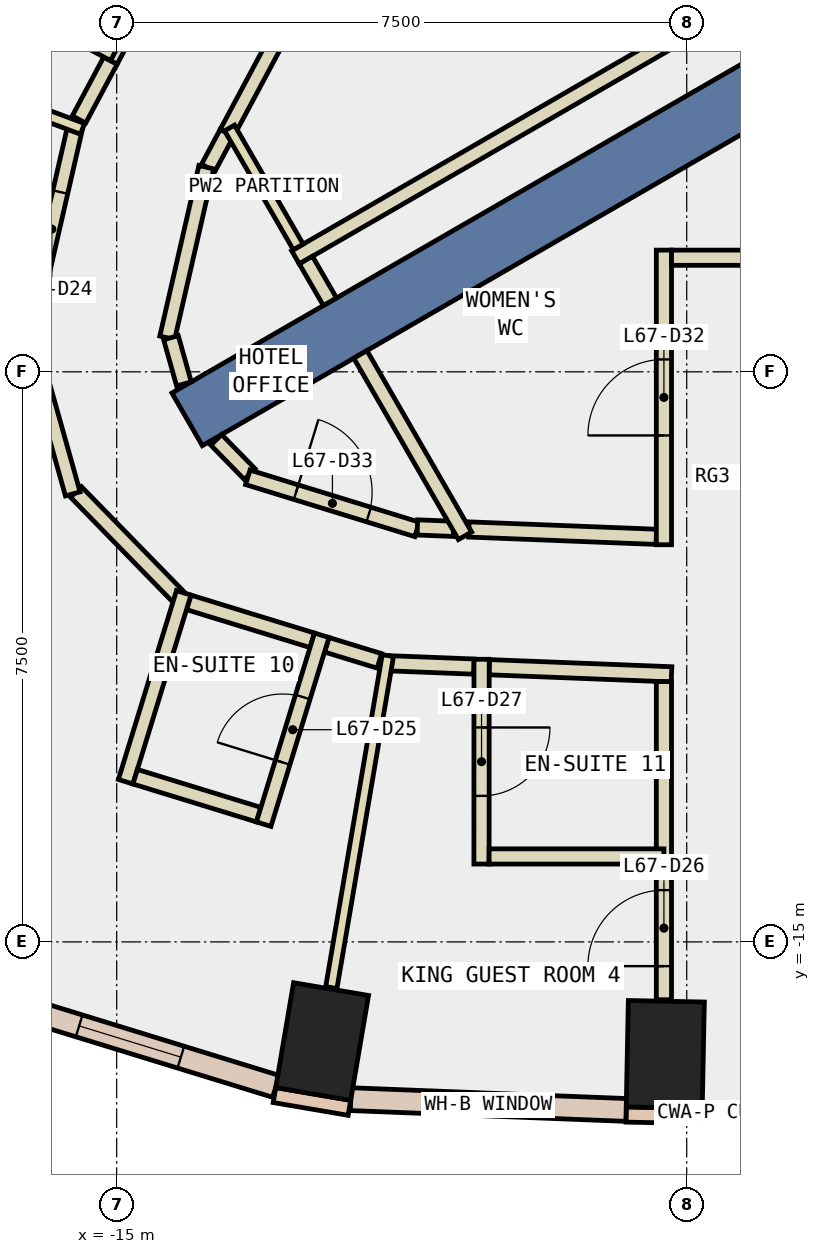
"""IFC4 building model, lengths in metres.
Left out: names, types, materials, properties, quantities, classifications, styles, units other than length and angle.
Written with IfcOpenShell. Run it as: python <this file> out.ifc"""

import sys

from ifc_helpers import new_model, si_unit, direction, frame, frame_2d, origin, origin_2d, place, context, subcontext, project, spatial, polyline, rectangle, outline, extrude, element, fill, save


model = new_model("IFC4")
c1 = context("Model", 3, precision=1e-05, world=origin(), true_north=direction((0.0, 1.0)))
c2 = subcontext(c1, "Body", "Model", "MODEL_VIEW")
j1 = project(units=[si_unit("LENGTHUNIT", "METRE"), si_unit("PLANEANGLEUNIT", "RADIAN")], contexts=[c1])
p1 = place(None, origin())
s1 = spatial("IfcSite", under=j1, at=p1, CompositionType="ELEMENT")
p2 = place(p1, origin())
s2 = spatial("IfcBuilding", under=s1, at=p2, CompositionType="ELEMENT")
p3 = place(p2, frame((0.0, 0.0, 290.0)))
s3 = spatial("IfcBuildingStorey", under=s2, at=p3, CompositionType="ELEMENT", Elevation=290.0)
for number, where, z_axis, x_axis in (
    (1, (-12.297, -16.311, -0.34), (0.0, 0.0, 1.0), (-0.986, 0.168, 0.0)),
    (2, (-7.782, -16.481, -0.34), (0.0, 0.0, 1.0), (-1.0, 0.02, 0.0)),
):
    element("IfcColumn", number, at=place(p3, frame(where, z_axis=z_axis, x_axis=x_axis)), inside=s3, PredefinedType="COLUMN", context=c2, shape_type="SweptSolid", body=[
        extrude(rectangle(XDim=1.0, YDim=1.4, at=origin_2d()), origin(), (0.0, 0.0, 1.0), 3.6),
    ])
p4 = place(p3, frame((0.0, 0.0, -0.34)))
e3 = element("IfcWall", 3, at=p4, inside=s3, PredefinedType="SHEAR", context=c2, shape_type="SweptSolid", body=[
    extrude(outline(polyline([(-9.815, 2.5), (-4.907, -6.0), (-4.619, -5.5), (-9.238, 2.5), (-9.815, 2.5)])), origin(), (0.0, 0.0, 1.0), 3.6),
])
p5 = place(p3, frame((-6.279, -3.625, -0.34), z_axis=(0.0, 0.0, 1.0), x_axis=(-0.866017533419, -0.500013631625, 0.0)))
e4 = element("IfcWall", 4, at=p5, inside=s3, PredefinedType="SHEAR", context=c2, shape_type="SweptSolid", body=[
    extrude(rectangle(XDim=9.0, YDim=0.8, at=frame_2d((4.5, 0.0))), origin(), (0.0, 0.0, 1.0), 3.6),
])
for number, where, z_axis, x_axis in (
    (5, (-12.924, -17.015, 0.0), (0.0, 0.0, 1.0), (0.986, -0.168, 0.0)),
    (6, (-8.298, -17.271, 0.0), (0.0, 0.0, 1.0), (1.0, -0.02, 0.0)),
):
    element("IfcWall", number, at=place(p3, frame(where, z_axis=z_axis, x_axis=x_axis)), inside=s3, PredefinedType="STANDARD", context=c2, shape_type="SweptSolid", body=[
        extrude(rectangle(XDim=1.0, YDim=0.2, at=frame_2d((0.5, 0.0))), origin(), (0.0, 0.0, 1.0), 3.26),
    ])
p6 = place(p3, frame((-11.92, -17.069, 0.0), z_axis=(0.0, 0.0, 1.0), x_axis=(0.999234893779, -0.039110446866, 0.0)))
e7 = element("IfcWall", 7, at=p6, inside=s3, PredefinedType="STANDARD", context=c2, shape_type="SweptSolid", body=[
    extrude(rectangle(XDim=3.627, YDim=0.3, at=frame_2d((1.813, 0.0))), origin(), (0.0, 0.0, 1.0), 3.26),
])
p7 = place(p6, frame((1.113, 0.0, 0.9)))
e8 = element("IfcOpeningElement", 8, at=p7, cuts=e7, PredefinedType="OPENING", context=c2, shape_type="SweptSolid", body=[
    extrude(rectangle(XDim=1.4, YDim=2.0, at=frame_2d((0.7, 1.0))), frame((0.0, 0.16, 0.0), z_axis=(0.0, -1.0, 0.0), x_axis=(1.0, 0.0, 0.0)), (0.0, 0.0, 1.0), 0.32),
])
p8 = place(p3, frame((-16.746, -15.72, 0.0), z_axis=(0.0, 0.0, 1.0), x_axis=(0.955866957005, -0.293799864716, 0.0)))
e9 = element("IfcWall", 9, at=p8, inside=s3, PredefinedType="STANDARD", context=c2, shape_type="SweptSolid", body=[
    extrude(rectangle(XDim=4.02, YDim=0.3, at=frame_2d((2.01, 0.0))), origin(), (0.0, 0.0, 1.0), 3.26),
])
p9 = place(p8, frame((1.31, 0.0, 0.9)))
e10 = element("IfcOpeningElement", 10, at=p9, cuts=e9, PredefinedType="OPENING", context=c2, shape_type="SweptSolid", body=[
    extrude(rectangle(XDim=1.4, YDim=2.0, at=frame_2d((0.7, 1.0))), frame((0.0, 0.16, 0.0), z_axis=(0.0, -1.0, 0.0), x_axis=(1.0, 0.0, 0.0)), (0.0, 0.0, 1.0), 0.32),
])
p10 = place(p3, frame((-10.639, 1.084, 0.0), z_axis=(0.0, 0.0, 1.0), x_axis=(-0.471696599276, -0.881760918975, 0.0)))
e11 = element("IfcWall", 11, at=p10, inside=s3, PredefinedType="PARTITIONING", context=c2, shape_type="SweptSolid", body=[
    extrude(rectangle(XDim=6.172, YDim=0.2, at=frame_2d((3.086, 0.0))), origin(), (0.0, 0.0, 1.0), 3.26),
])
p11 = place(p10, frame((2.458, 0.0, 0.0)))
e12 = element("IfcOpeningElement", 12, at=p11, cuts=e11, PredefinedType="OPENING", context=c2, shape_type="SweptSolid", body=[
    extrude(rectangle(XDim=1.0, YDim=2.1, at=frame_2d((0.5, 1.05))), frame((0.0, 0.11, 0.0), z_axis=(0.0, -1.0, 0.0), x_axis=(1.0, 0.0, 0.0)), (0.0, 0.0, 1.0), 0.22),
])
p12 = place(p3, frame((-10.367, -9.574, 0.0), z_axis=(0.0, 0.0, 1.0), x_axis=(0.999229139158, -0.039257196264, 0.0)))
e13 = element("IfcWall", 13, at=p12, inside=s3, PredefinedType="PARTITIONING", context=c2, shape_type="SweptSolid", body=[
    extrude(rectangle(XDim=2.469, YDim=0.2, at=frame_2d((1.234, 0.0))), origin(), (0.0, 0.0, 1.0), 3.26),
])
p13 = place(p3, frame((-13.55, -4.358, 0.0), z_axis=(0.0, 0.0, 1.0), x_axis=(-0.472169364753, -0.881507850781, 0.0)))
e14 = element("IfcWall", 14, at=p13, inside=s3, PredefinedType="PARTITIONING", context=c2, shape_type="SweptSolid", body=[
    extrude(rectangle(XDim=0.521, YDim=0.2, at=frame_2d((0.26, 0.0))), origin(), (0.0, 0.0, 1.0), 3.26),
])
p14 = place(p3, frame((-13.821, -4.808, 0.0), z_axis=(0.0, 0.0, 1.0), x_axis=(-0.223248099856, -0.97476165595, 0.0)))
e15 = element("IfcWall", 15, at=p14, inside=s3, PredefinedType="PARTITIONING", context=c2, shape_type="SweptSolid", body=[
    extrude(rectangle(XDim=2.302, YDim=0.2, at=frame_2d((1.151, 0.0))), origin(), (0.0, 0.0, 1.0), 3.26),
])
p15 = place(p3, frame((-14.286, -7.051, 0.0), z_axis=(0.0, 0.0, 1.0), x_axis=(0.270633612894, -0.96268242301, 0.0)))
e16 = element("IfcWall", 16, at=p15, inside=s3, PredefinedType="PARTITIONING", context=c2, shape_type="SweptSolid", body=[
    extrude(rectangle(XDim=0.632, YDim=0.2, at=frame_2d((0.316, 0.0))), origin(), (0.0, 0.0, 1.0), 3.26),
])
p16 = place(p3, frame((-13.69, -8.395, 0.0), z_axis=(0.0, 0.0, 1.0), x_axis=(0.698333537371, -0.715772499181, 0.0)))
e17 = element("IfcWall", 17, at=p16, inside=s3, PredefinedType="PARTITIONING", context=c2, shape_type="SweptSolid", body=[
    extrude(rectangle(XDim=0.63, YDim=0.2, at=frame_2d((0.315, 0.0))), origin(), (0.0, 0.0, 1.0), 3.26),
])
p17 = place(p3, frame((-13.275, -8.888, 0.0), z_axis=(0.0, 0.0, 1.0), x_axis=(0.955792602122, -0.294041666654, 0.0)))
e18 = element("IfcWall", 18, at=p17, inside=s3, PredefinedType="PARTITIONING", context=c2, shape_type="SweptSolid", body=[
    extrude(rectangle(XDim=2.33, YDim=0.2, at=frame_2d((1.165, 0.0))), origin(), (0.0, 0.0, 1.0), 3.26),
])
p18 = place(p17, frame((0.665, 0.0, 0.0)))
e19 = element("IfcOpeningElement", 19, at=p18, cuts=e18, PredefinedType="OPENING", context=c2, shape_type="SweptSolid", body=[
    extrude(rectangle(XDim=1.0, YDim=2.1, at=frame_2d((0.5, 1.05))), frame((0.0, 0.11, 0.0), z_axis=(0.0, -1.0, 0.0), x_axis=(1.0, 0.0, 0.0)), (0.0, 0.0, 1.0), 0.22),
])
p19 = place(p3, frame((-11.044, -9.547, 0.0), z_axis=(0.0, 0.0, 1.0), x_axis=(0.999224473046, -0.039375785274, 0.0)))
e20 = element("IfcWall", 20, at=p19, inside=s3, PredefinedType="PARTITIONING", context=c2, shape_type="SweptSolid", body=[
    extrude(rectangle(XDim=0.478, YDim=0.2, at=frame_2d((0.239, 0.0))), origin(), (0.0, 0.0, 1.0), 3.26),
])
p20 = place(p3, frame((-15.496, -4.18, 0.0), z_axis=(0.0, 0.0, 1.0), x_axis=(0.471280380621, 0.881983448167, 0.0)))
e21 = element("IfcWall", 21, at=p20, inside=s3, PredefinedType="PARTITIONING", context=c2, shape_type="SweptSolid", body=[
    extrude(rectangle(XDim=0.879, YDim=0.2, at=frame_2d((0.439, 0.0))), origin(), (0.0, 0.0, 1.0), 3.26),
])
p21 = place(p3, frame((-15.082, -3.405, 0.0), z_axis=(0.0, 0.0, 1.0), x_axis=(0.471719946084, 0.88174842924, 0.0)))
e22 = element("IfcWall", 22, at=p21, inside=s3, PredefinedType="PARTITIONING", context=c2, shape_type="SweptSolid", body=[
    extrude(rectangle(XDim=3.0, YDim=0.2, at=frame_2d((1.5, 0.0))), origin(), (0.0, 0.0, 1.0), 3.26),
])
p22 = place(p3, frame((-11.544, -11.303, 0.0), z_axis=(0.0, 0.0, 1.0), x_axis=(-0.956186468463, 0.292758326147, 0.0)))
e23 = element("IfcWall", 23, at=p22, inside=s3, PredefinedType="PARTITIONING", context=c2, shape_type="SweptSolid", body=[
    extrude(rectangle(XDim=0.724, YDim=0.2, at=frame_2d((0.362, 0.0))), origin(), (0.0, 0.0, 1.0), 3.26),
])
p23 = place(p3, frame((-14.147, -10.503, 0.0), z_axis=(0.0, 0.0, 1.0), x_axis=(-0.698515752779, 0.715594677957, 0.0)))
e24 = element("IfcWall", 24, at=p23, inside=s3, PredefinedType="PARTITIONING", context=c2, shape_type="SweptSolid", body=[
    extrude(rectangle(XDim=1.987, YDim=0.2, at=frame_2d((0.994, 0.0))), origin(), (0.0, 0.0, 1.0), 3.26),
])
p24 = place(p3, frame((-15.578, -9.106, 0.0), z_axis=(0.0, 0.0, 1.0), x_axis=(-0.270688011946, 0.962667128445, 0.0)))
e25 = element("IfcWall", 25, at=p24, inside=s3, PredefinedType="PARTITIONING", context=c2, shape_type="SweptSolid", body=[
    extrude(rectangle(XDim=2.088, YDim=0.2, at=frame_2d((1.044, 0.0))), origin(), (0.0, 0.0, 1.0), 3.26),
])
p25 = place(p3, frame((-16.192, -7.098, 0.0), z_axis=(0.0, 0.0, 1.0), x_axis=(0.22330023395, 0.974749714295, 0.0)))
e26 = element("IfcWall", 26, at=p25, inside=s3, PredefinedType="PARTITIONING", context=c2, shape_type="SweptSolid", body=[
    extrude(rectangle(XDim=2.928, YDim=0.2, at=frame_2d((1.464, 0.0))), origin(), (0.0, 0.0, 1.0), 3.26),
])
p26 = place(p25, frame((1.014, 0.0, 0.0)))
e27 = element("IfcOpeningElement", 27, at=p26, cuts=e26, PredefinedType="OPENING", context=c2, shape_type="SweptSolid", body=[
    extrude(rectangle(XDim=1.0, YDim=2.1, at=frame_2d((0.5, 1.05))), frame((0.0, 0.11, 0.0), z_axis=(0.0, -1.0, 0.0), x_axis=(1.0, 0.0, 0.0)), (0.0, 0.0, 1.0), 0.22),
])
p27 = place(p3, frame((-12.427, -11.032, 0.0), z_axis=(0.0, 0.0, 1.0), x_axis=(-0.955940341053, 0.293561006177, 0.0)))
e28 = element("IfcWall", 28, at=p27, inside=s3, PredefinedType="PARTITIONING", context=c2, shape_type="SweptSolid", body=[
    extrude(rectangle(XDim=1.7, YDim=0.2, at=frame_2d((0.85, 0.0))), origin(), (0.0, 0.0, 1.0), 3.26),
])
p28 = place(p3, frame((-10.299, -11.378, 0.0), z_axis=(0.0, 0.0, 1.0), x_axis=(-0.999237995813, 0.03903111224, 0.0)))
e29 = element("IfcWall", 29, at=p28, inside=s3, PredefinedType="PARTITIONING", context=c2, shape_type="SweptSolid", body=[
    extrude(rectangle(XDim=1.176, YDim=0.2, at=frame_2d((0.588, 0.0))), origin(), (0.0, 0.0, 1.0), 3.26),
])
p29 = place(p3, frame((-7.7, -11.48, 0.0), z_axis=(0.0, 0.0, 1.0), x_axis=(-0.999233433291, 0.039147743138, 0.0)))
e30 = element("IfcWall", 30, at=p29, inside=s3, PredefinedType="PARTITIONING", context=c2, shape_type="SweptSolid", body=[
    extrude(rectangle(XDim=2.401, YDim=0.2, at=frame_2d((1.201, 0.0))), origin(), (0.0, 0.0, 1.0), 3.26),
])
p30 = place(p3, frame((-7.8, -9.775, 0.0), z_axis=(0.0, 0.0, 1.0), x_axis=(0.0, 1.0, 0.0)))
e31 = element("IfcWall", 31, at=p30, inside=s3, PredefinedType="PARTITIONING", context=c2, shape_type="SweptSolid", body=[
    extrude(rectangle(XDim=3.876, YDim=0.2, at=frame_2d((1.938, 0.0))), origin(), (0.0, 0.0, 1.0), 3.26),
])
p31 = place(p30, frame((1.438, 0.0, 0.0)))
e32 = element("IfcOpeningElement", 32, at=p31, cuts=e31, PredefinedType="OPENING", context=c2, shape_type="SweptSolid", body=[
    extrude(rectangle(XDim=1.0, YDim=2.1, at=frame_2d((0.5, 1.05))), frame((0.0, 0.11, 0.0), z_axis=(0.0, -1.0, 0.0), x_axis=(1.0, 0.0, 0.0)), (0.0, 0.0, 1.0), 0.22),
])
p32 = place(p3, frame((-7.7, -5.999, 0.0), z_axis=(0.0, 0.0, 1.0), x_axis=(1.0, 0.0, 0.0)))
e33 = element("IfcWall", 33, at=p32, inside=s3, PredefinedType="PARTITIONING", context=c2, shape_type="SweptSolid", body=[
    extrude(rectangle(XDim=2.792, YDim=0.2, at=frame_2d((1.396, 0.0))), origin(), (0.0, 0.0, 1.0), 3.26),
])
p33 = place(p3, frame((-7.8, -15.761, 0.0), z_axis=(0.0, 0.0, 1.0), x_axis=(0.0, 1.0, 0.0)))
e34 = element("IfcWall", 34, at=p33, inside=s3, PredefinedType="PARTITIONING", context=c2, shape_type="SweptSolid", body=[
    extrude(rectangle(XDim=1.785, YDim=0.2, at=frame_2d((0.893, 0.0))), origin(), (0.0, 0.0, 1.0), 3.26),
])
p34 = place(p33, frame((0.442, 0.0, 0.0)))
e35 = element("IfcOpeningElement", 35, at=p34, cuts=e34, PredefinedType="OPENING", context=c2, shape_type="SweptSolid", body=[
    extrude(rectangle(XDim=1.0, YDim=2.1, at=frame_2d((0.5, 1.05))), frame((0.0, 0.11, 0.0), z_axis=(0.0, -1.0, 0.0), x_axis=(1.0, 0.0, 0.0)), (0.0, 0.0, 1.0), 0.22),
])
p35 = place(p3, frame((-7.8, -13.976, 0.0), z_axis=(0.0, 0.0, 1.0), x_axis=(0.0, 1.0, 0.0)))
e36 = element("IfcWall", 36, at=p35, inside=s3, PredefinedType="PARTITIONING", context=c2, shape_type="SweptSolid", body=[
    extrude(rectangle(XDim=2.4, YDim=0.2, at=frame_2d((1.2, 0.0))), origin(), (0.0, 0.0, 1.0), 3.26),
])
p36 = place(p3, frame((-6.845, -2.643, 0.0), z_axis=(0.0, 0.0, 1.0), x_axis=(-0.865994457699, -0.500053596362, 0.0)))
e37 = element("IfcWall", 37, at=p36, inside=s3, PredefinedType="PARTITIONING", context=c2, shape_type="SweptSolid", body=[
    extrude(rectangle(XDim=6.701, YDim=0.2, at=frame_2d((3.351, 0.0))), origin(), (0.0, 0.0, 1.0), 3.26),
])
p37 = place(p3, frame((-12.611, -5.857, 0.0), z_axis=(0.0, 0.0, 1.0), x_axis=(-0.500120037633, 0.865956088932, 0.0)))
e38 = element("IfcWall", 38, at=p37, inside=s3, PredefinedType="PARTITIONING", context=c2, shape_type="SweptSolid", body=[
    extrude(rectangle(XDim=1.807, YDim=0.15, at=frame_2d((0.904, 0.0))), origin(), (0.0, 0.0, 1.0), 3.26),
])
p38 = place(p3, frame((-10.417, -9.657, 0.0), z_axis=(0.0, 0.0, 1.0), x_axis=(-0.499837531988, 0.866119184418, 0.0)))
e39 = element("IfcWall", 39, at=p38, inside=s3, PredefinedType="PARTITIONING", context=c2, shape_type="SweptSolid", body=[
    extrude(rectangle(XDim=2.755, YDim=0.2, at=frame_2d((1.377, 0.0))), origin(), (0.0, 0.0, 1.0), 3.26),
])
p39 = place(p3, frame((-17.239, -2.137, 0.0), z_axis=(0.0, 0.0, 1.0), x_axis=(0.881706262609, -0.471798756332, 0.0)))
e40 = element("IfcWall", 40, at=p39, inside=s3, PredefinedType="PARTITIONING", context=c2, shape_type="SweptSolid", body=[
    extrude(rectangle(XDim=2.501, YDim=0.2, at=frame_2d((1.25, 0.0))), origin(), (0.0, 0.0, 1.0), 3.26),
])
p40 = place(p3, frame((-15.45, -4.304, 0.0), z_axis=(0.0, 0.0, 1.0), x_axis=(-0.936458128132, 0.350779381172, 0.0)))
e41 = element("IfcWall", 41, at=p40, inside=s3, PredefinedType="PARTITIONING", context=c2, shape_type="SweptSolid", body=[
    extrude(rectangle(XDim=4.433, YDim=0.15, at=frame_2d((2.216, 0.0))), origin(), (0.0, 0.0, 1.0), 3.26),
])
p41 = place(p3, frame((-14.118, -10.408, 0.0), z_axis=(0.0, 0.0, 1.0), x_axis=(-0.293914282011, -0.955831781659, 0.0)))
e42 = element("IfcWall", 42, at=p41, inside=s3, PredefinedType="PARTITIONING", context=c2, shape_type="SweptSolid", body=[
    extrude(rectangle(XDim=2.6, YDim=0.2, at=frame_2d((1.3, 0.0))), origin(), (0.0, 0.0, 1.0), 3.26),
])
p42 = place(p3, frame((-14.757, -12.827, 0.0), z_axis=(0.0, 0.0, 1.0), x_axis=(0.955940341053, -0.293561006177, 0.0)))
e43 = element("IfcWall", 43, at=p42, inside=s3, PredefinedType="PARTITIONING", context=c2, shape_type="SweptSolid", body=[
    extrude(rectangle(XDim=1.7, YDim=0.2, at=frame_2d((0.85, 0.0))), origin(), (0.0, 0.0, 1.0), 3.26),
])
p43 = place(p3, frame((-13.066, -13.451, 0.0), z_axis=(0.0, 0.0, 1.0), x_axis=(0.293854864179, 0.955850050373, 0.0)))
e44 = element("IfcWall", 44, at=p43, inside=s3, PredefinedType="PARTITIONING", context=c2, shape_type="SweptSolid", body=[
    extrude(rectangle(XDim=2.6, YDim=0.2, at=frame_2d((1.3, 0.0))), origin(), (0.0, 0.0, 1.0), 3.26),
])
p44 = place(p43, frame((0.85, 0.0, 0.0)))
e45 = element("IfcOpeningElement", 45, at=p44, cuts=e44, PredefinedType="OPENING", context=c2, shape_type="SweptSolid", body=[
    extrude(rectangle(XDim=0.9, YDim=2.1, at=frame_2d((0.45, 1.05))), frame((0.0, 0.11, 0.0), z_axis=(0.0, -1.0, 0.0), x_axis=(1.0, 0.0, 0.0)), (0.0, 0.0, 1.0), 0.22),
])
p45 = place(p3, frame((-11.432, -11.234, 0.0), z_axis=(0.0, 0.0, 1.0), x_axis=(-0.16797255243, -0.98579167253, 0.0)))
e46 = element("IfcWall", 46, at=p45, inside=s3, PredefinedType="PARTITIONING", context=c2, shape_type="SweptSolid", body=[
    extrude(rectangle(XDim=4.43, YDim=0.15, at=frame_2d((2.215, 0.0))), origin(), (0.0, 0.0, 1.0), 3.26),
])
p46 = place(p3, frame((-10.199, -11.282, 0.0), z_axis=(0.0, 0.0, 1.0), x_axis=(-0.000362482985, -0.999999934303, 0.0)))
e47 = element("IfcWall", 47, at=p46, inside=s3, PredefinedType="PARTITIONING", context=c2, shape_type="SweptSolid", body=[
    extrude(rectangle(XDim=2.694, YDim=0.2, at=frame_2d((1.347, 0.0))), origin(), (0.0, 0.0, 1.0), 3.26),
])
p47 = place(p46, frame((0.897, 0.0, 0.0)))
e48 = element("IfcOpeningElement", 48, at=p47, cuts=e47, PredefinedType="OPENING", context=c2, shape_type="SweptSolid", body=[
    extrude(rectangle(XDim=0.9, YDim=2.1, at=frame_2d((0.45, 1.05))), frame((0.0, 0.11, 0.0), z_axis=(0.0, -1.0, 0.0), x_axis=(1.0, 0.0, 0.0)), (0.0, 0.0, 1.0), 0.22),
])
p48 = place(p3, frame((-10.1, -13.876, 0.0), z_axis=(0.0, 0.0, 1.0), x_axis=(1.0, 0.0, 0.0)))
e49 = element("IfcWall", 49, at=p48, inside=s3, PredefinedType="PARTITIONING", context=c2, shape_type="SweptSolid", body=[
    extrude(rectangle(XDim=2.3, YDim=0.2, at=frame_2d((1.15, 0.0))), origin(), (0.0, 0.0, 1.0), 3.26),
])
p49 = place(p3, frame((-12.194, -6.578, 0.0), z_axis=(0.0, 0.0, 1.0), x_axis=(-0.500701704226, 0.865619895442, 0.0)))
e50 = element("IfcWall", 50, at=p49, inside=s3, PredefinedType="PARTITIONING", context=c2, shape_type="SweptSolid", body=[
    extrude(rectangle(XDim=0.633, YDim=0.2, at=frame_2d((0.316, 0.0))), origin(), (0.0, 0.0, 1.0), 3.26),
])
p50 = place(p3, frame((-8.192, 0.888, 0.0), z_axis=(0.0, 0.0, 1.0), x_axis=(0.500034260056, -0.866005622828, 0.0)))
e51 = element("IfcWall", 51, at=p50, inside=s3, PredefinedType="STANDARD", context=c2, shape_type="SweptSolid", body=[
    extrude(rectangle(XDim=5.399, YDim=0.2, at=frame_2d((2.7, 0.0))), origin(), (0.0, 0.0, 1.0), 3.26),
])
p51 = place(p7, origin())
e52 = element("IfcWindow", 52, at=p51, inside=s3, PartitioningType="SINGLE_PANEL", PredefinedType="WINDOW", context=c2, shape_type="SweptSolid", body=[
    extrude(rectangle(XDim=1.4, YDim=2.0, at=frame_2d((0.7, 1.0))), frame((0.0, 0.03, 0.0), z_axis=(0.0, -1.0, 0.0), x_axis=(1.0, 0.0, 0.0)), (0.0, 0.0, 1.0), 0.06),
])
fill(e8, e52)
p52 = place(p9, origin())
e53 = element("IfcWindow", 53, at=p52, inside=s3, PartitioningType="SINGLE_PANEL", PredefinedType="WINDOW", context=c2, shape_type="SweptSolid", body=[
    extrude(rectangle(XDim=1.4, YDim=2.0, at=frame_2d((0.7, 1.0))), frame((0.0, 0.03, 0.0), z_axis=(0.0, -1.0, 0.0), x_axis=(1.0, 0.0, 0.0)), (0.0, 0.0, 1.0), 0.06),
])
fill(e10, e53)
p53 = place(p26, origin())
e54 = element("IfcDoor", 54, at=p53, inside=s3, OperationType="SINGLE_SWING_LEFT", PredefinedType="DOOR", context=c2, shape_type="SweptSolid", body=[
    extrude(rectangle(XDim=1.0, YDim=2.1, at=frame_2d((0.5, 1.05))), frame((0.0, 0.025, 0.0), z_axis=(0.0, -1.0, 0.0), x_axis=(1.0, 0.0, 0.0)), (0.0, 0.0, 1.0), 0.05),
])
fill(e27, e54)
p54 = place(p44, origin())
e55 = element("IfcDoor", 55, at=p54, inside=s3, OperationType="SINGLE_SWING_LEFT", PredefinedType="DOOR", context=c2, shape_type="SweptSolid", body=[
    extrude(rectangle(XDim=0.9, YDim=2.1, at=frame_2d((0.45, 1.05))), frame((0.0, 0.025, 0.0), z_axis=(0.0, -1.0, 0.0), x_axis=(1.0, 0.0, 0.0)), (0.0, 0.0, 1.0), 0.05),
])
fill(e45, e55)
p55 = place(p34, origin())
e56 = element("IfcDoor", 56, at=p55, inside=s3, OperationType="SINGLE_SWING_RIGHT", PredefinedType="DOOR", context=c2, shape_type="SweptSolid", body=[
    extrude(rectangle(XDim=1.0, YDim=2.1, at=frame_2d((0.5, 1.05))), frame((0.0, 0.025, 0.0), z_axis=(0.0, -1.0, 0.0), x_axis=(1.0, 0.0, 0.0)), (0.0, 0.0, 1.0), 0.05),
])
fill(e35, e56)
p56 = place(p47, origin())
e57 = element("IfcDoor", 57, at=p56, inside=s3, OperationType="SINGLE_SWING_LEFT", PredefinedType="DOOR", context=c2, shape_type="SweptSolid", body=[
    extrude(rectangle(XDim=0.9, YDim=2.1, at=frame_2d((0.45, 1.05))), frame((0.0, 0.025, 0.0), z_axis=(0.0, -1.0, 0.0), x_axis=(1.0, 0.0, 0.0)), (0.0, 0.0, 1.0), 0.05),
])
fill(e48, e57)
p57 = place(p31, origin())
e58 = element("IfcDoor", 58, at=p57, inside=s3, OperationType="SINGLE_SWING_LEFT", PredefinedType="DOOR", context=c2, shape_type="SweptSolid", body=[
    extrude(rectangle(XDim=1.0, YDim=2.1, at=frame_2d((0.5, 1.05))), frame((0.0, 0.025, 0.0), z_axis=(0.0, -1.0, 0.0), x_axis=(1.0, 0.0, 0.0)), (0.0, 0.0, 1.0), 0.05),
])
fill(e32, e58)
p58 = place(p18, origin())
e59 = element("IfcDoor", 59, at=p58, inside=s3, OperationType="SINGLE_SWING_LEFT", PredefinedType="DOOR", context=c2, shape_type="SweptSolid", body=[
    extrude(rectangle(XDim=1.0, YDim=2.1, at=frame_2d((0.5, 1.05))), frame((0.0, 0.025, 0.0), z_axis=(0.0, -1.0, 0.0), x_axis=(1.0, 0.0, 0.0)), (0.0, 0.0, 1.0), 0.05),
])
fill(e19, e59)
save(model, sys.argv[1])
